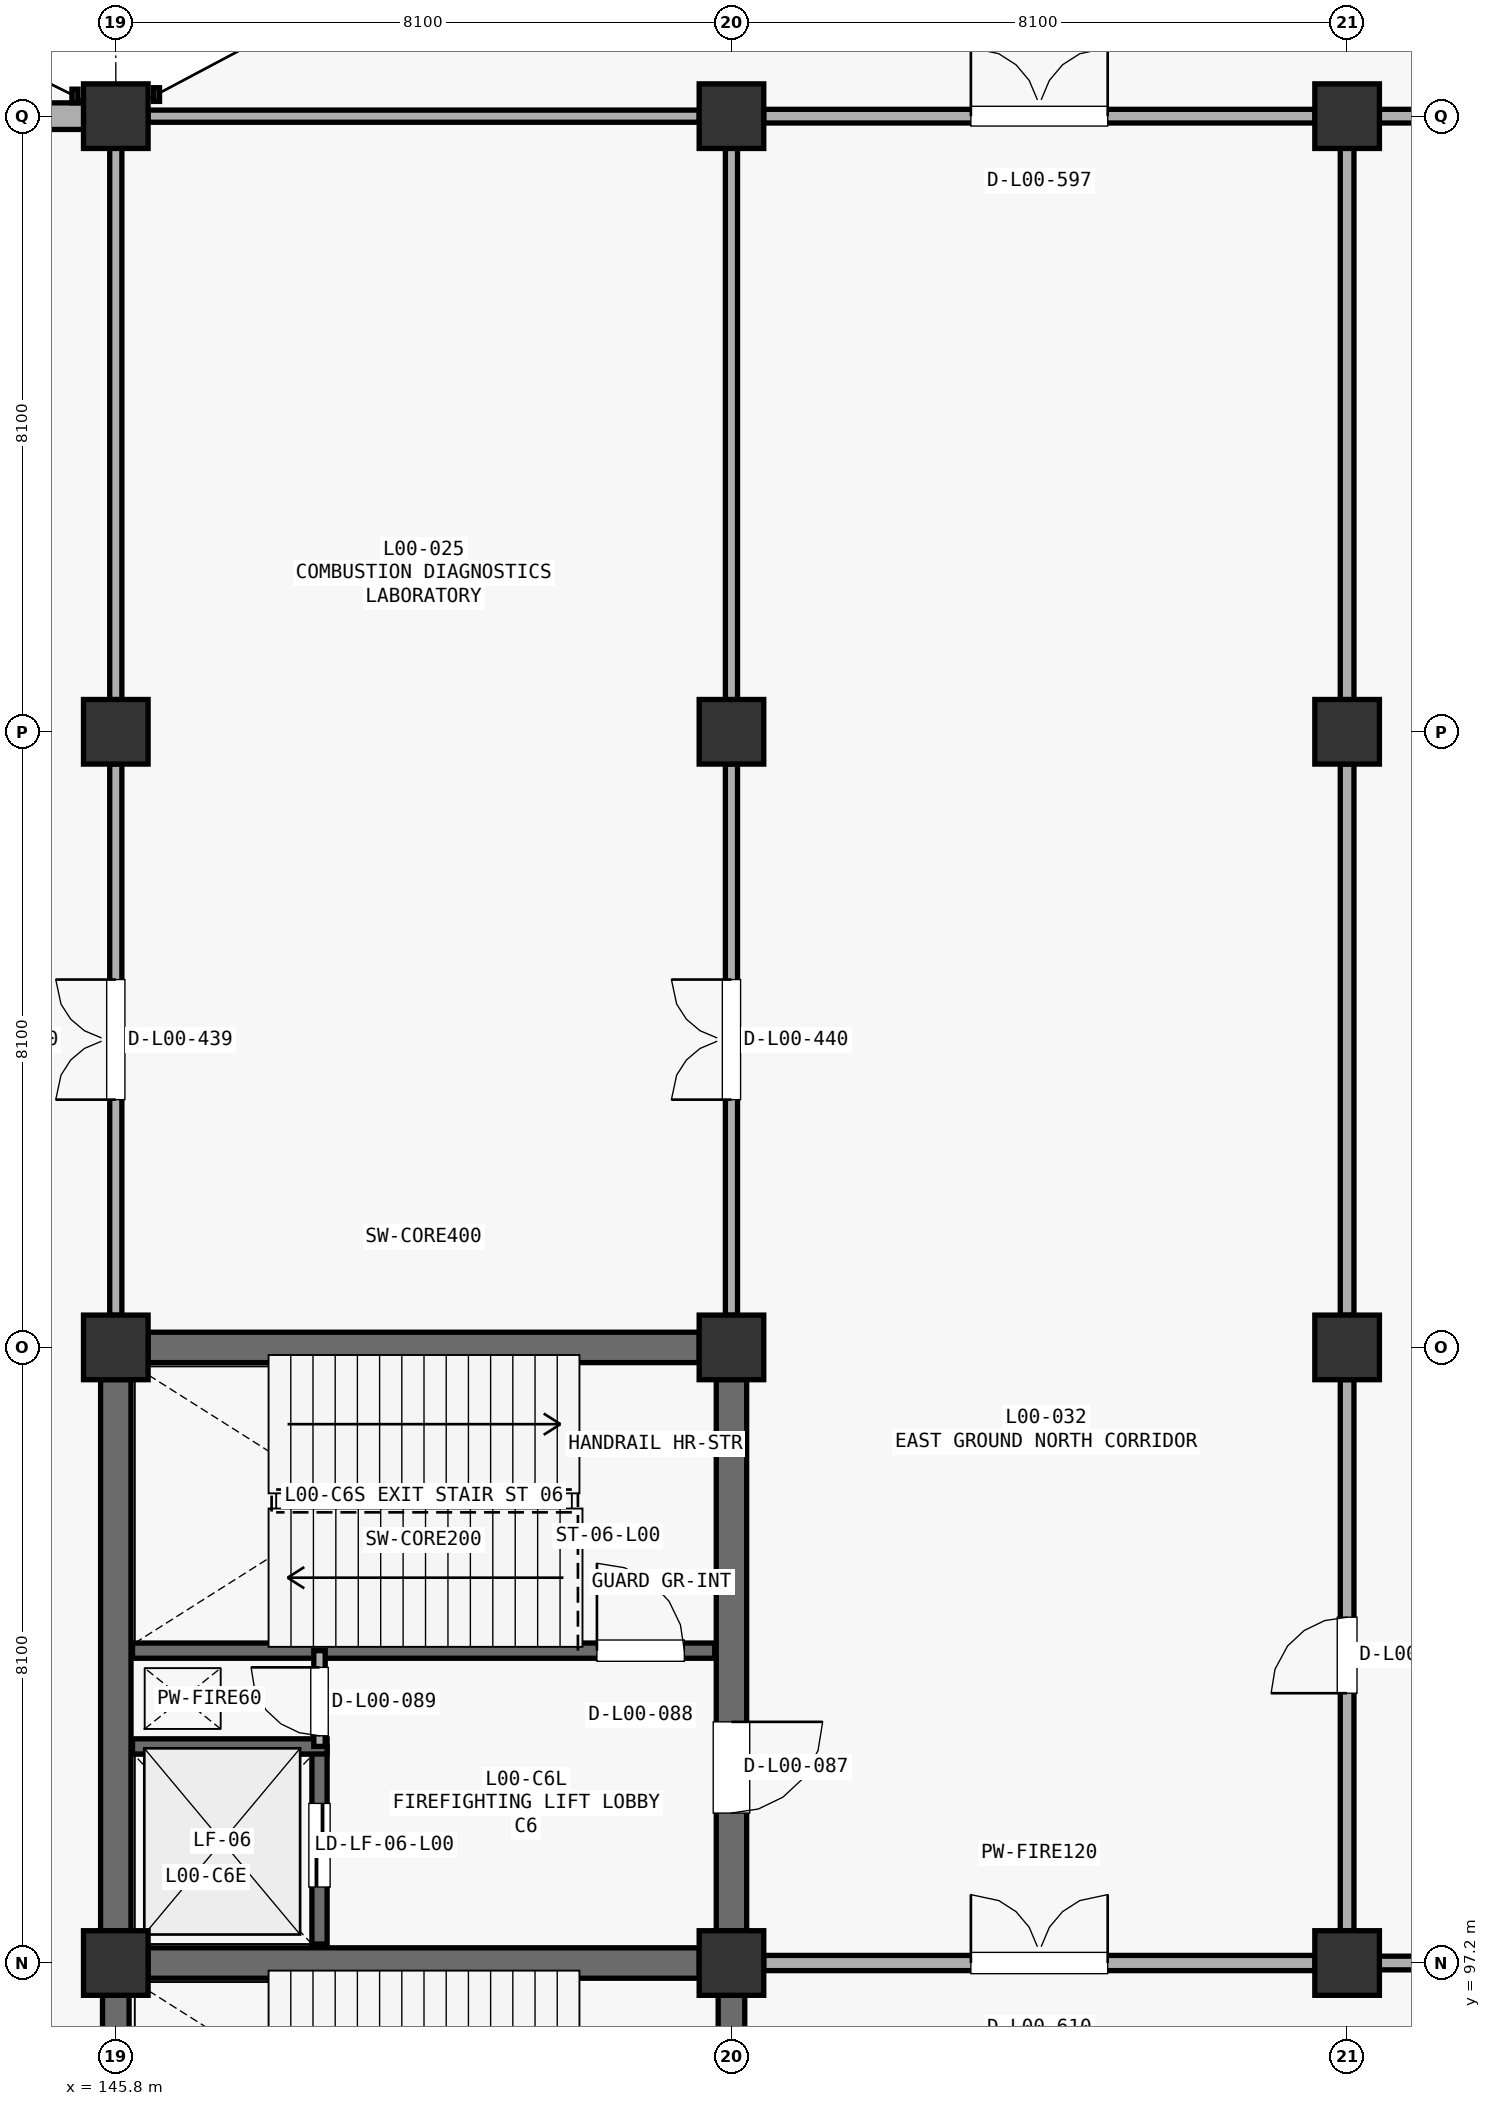
"""IFC4 building model, lengths in metres.
Left out: names, types, materials, properties, quantities, classifications, styles, units other than length and angle.
Written with IfcOpenShell. Run it as: python <this file> out.ifc"""

import sys

from ifc_helpers import new_model, si_unit, direction, frame, frame_2d, origin, origin_2d, place, context, subcontext, project, spatial, rectangle, extrude, element, fill, save


model = new_model("IFC4")
c1 = context("Model", 3, precision=1e-05, world=origin(), true_north=direction((0.0, 1.0)))
c2 = subcontext(c1, "Body", "Model", "MODEL_VIEW")
j1 = project(units=[si_unit("LENGTHUNIT", "METRE"), si_unit("PLANEANGLEUNIT", "RADIAN")], contexts=[c1])
p1 = place(None, origin())
s1 = spatial("IfcSite", under=j1, at=p1, CompositionType="ELEMENT")
p2 = place(p1, origin())
s2 = spatial("IfcBuilding", under=s1, at=p2, CompositionType="ELEMENT")
p3 = place(p2, origin())
s3 = spatial("IfcBuildingStorey", under=s2, at=p3, CompositionType="ELEMENT", Elevation=0.0)
for number, where, z_axis, x_axis in (
    (1, (145.8, 97.2, 0.0), (0.0, 0.0, 1.0), (1.0, 0.0, 0.0)),
    (2, (145.8, 105.3, 0.0), (0.0, 0.0, 1.0), (1.0, 0.0, 0.0)),
    (3, (145.8, 113.4, 0.0), (0.0, 0.0, 1.0), (1.0, 0.0, 0.0)),
    (4, (145.8, 121.5, 0.0), (0.0, 0.0, 1.0), (1.0, 0.0, 0.0)),
    (5, (153.9, 97.2, 0.0), (0.0, 0.0, 1.0), (1.0, 0.0, 0.0)),
    (6, (153.9, 105.3, 0.0), (0.0, 0.0, 1.0), (1.0, 0.0, 0.0)),
    (7, (153.9, 113.4, 0.0), (0.0, 0.0, 1.0), (1.0, 0.0, 0.0)),
    (8, (153.9, 121.5, 0.0), (0.0, 0.0, 1.0), (1.0, 0.0, 0.0)),
    (9, (162.0, 97.2, 0.0), (0.0, 0.0, 1.0), (1.0, 0.0, 0.0)),
    (10, (162.0, 105.3, 0.0), (0.0, 0.0, 1.0), (1.0, 0.0, 0.0)),
    (11, (162.0, 113.4, 0.0), (0.0, 0.0, 1.0), (1.0, 0.0, 0.0)),
    (12, (162.0, 121.5, 0.0), (0.0, 0.0, 1.0), (1.0, 0.0, 0.0)),
):
    element("IfcColumn", number, at=place(p3, frame(where, z_axis=z_axis, x_axis=x_axis)), inside=s3, PredefinedType="COLUMN", context=c2, shape_type="SweptSolid", body=[
        extrude(rectangle(XDim=0.85, YDim=0.85, at=origin_2d()), origin(), (0.0, 0.0, 1.0), 5.1),
    ])
p4 = place(p3, frame((138.123, 121.5, 0.0), z_axis=(0.0, 0.0, 1.0), x_axis=(1.0, 0.0, 0.0)))
e13 = element("IfcWall", 13, at=p4, inside=s3, PredefinedType="STANDARD", context=c2, shape_type="SweptSolid", body=[
    extrude(rectangle(XDim=7.254, YDim=0.35, at=frame_2d((3.627, 0.0))), origin(), (0.0, 0.0, 1.0), 3.972),
])
p5 = place(p4, frame((2.827, 0.0, 0.85)))
e14 = element("IfcOpeningElement", 14, at=p5, cuts=e13, PredefinedType="OPENING", context=c2, shape_type="SweptSolid", body=[
    extrude(rectangle(XDim=1.6, YDim=1.85, at=frame_2d((0.8, 0.925))), frame((0.0, 0.185, 0.0), z_axis=(0.0, -1.0, 0.0), x_axis=(1.0, 0.0, 0.0)), (0.0, 0.0, 1.0), 0.37),
])
p6 = place(p3, frame((146.223, 105.3, 0.0), z_axis=(0.0, 0.0, 1.0), x_axis=(1.0, 0.0, 0.0)))
e15 = element("IfcWall", 15, at=p6, inside=s3, PredefinedType="SHEAR", context=c2, shape_type="SweptSolid", body=[
    extrude(rectangle(XDim=7.254, YDim=0.4, at=frame_2d((3.627, 0.0))), origin(), (0.0, 0.0, 1.0), 4.822),
])
p7 = place(p3, frame((145.8, 97.623, 0.0), z_axis=(0.0, 0.0, 1.0), x_axis=(0.0, 1.0, 0.0)))
e16 = element("IfcWall", 16, at=p7, inside=s3, PredefinedType="SHEAR", context=c2, shape_type="SweptSolid", body=[
    extrude(rectangle(XDim=7.254, YDim=0.4, at=frame_2d((3.627, 0.0))), origin(), (0.0, 0.0, 1.0), 4.822),
])
p8 = place(p3, frame((153.9, 97.623, 0.0), z_axis=(0.0, 0.0, 1.0), x_axis=(0.0, 1.0, 0.0)))
e17 = element("IfcWall", 17, at=p8, inside=s3, PredefinedType="SHEAR", context=c2, shape_type="SweptSolid", body=[
    extrude(rectangle(XDim=7.254, YDim=0.4, at=frame_2d((3.627, 0.0))), origin(), (0.0, 0.0, 1.0), 4.822),
])
p9 = place(p8, frame((2.75, 0.0, 0.0), z_axis=(0.0, 0.0, 1.0), x_axis=(-1.0, 0.0, 0.0)))
e18 = element("IfcOpeningElement", 18, at=p9, cuts=e17, PredefinedType="OPENING", context=c2, shape_type="SweptSolid", body=[
    extrude(rectangle(XDim=1.2, YDim=2.2, at=frame_2d((0.6, 1.1))), frame((0.0, 0.21, 0.0), z_axis=(0.0, -1.0, 0.0), x_axis=(1.0, 0.0, 0.0)), (0.0, 0.0, 1.0), 0.42),
])
p10 = place(p3, frame((146.223, 97.2, 0.0), z_axis=(0.0, 0.0, 1.0), x_axis=(1.0, 0.0, 0.0)))
e19 = element("IfcWall", 19, at=p10, inside=s3, PredefinedType="SHEAR", context=c2, shape_type="SweptSolid", body=[
    extrude(rectangle(XDim=7.254, YDim=0.4, at=frame_2d((3.627, 0.0))), origin(), (0.0, 0.0, 1.0), 4.822),
])
p11 = place(p3, frame((146.02, 101.31, 0.0), z_axis=(0.0, 0.0, 1.0), x_axis=(1.0, 0.0, 0.0)))
e20 = element("IfcWall", 20, at=p11, inside=s3, PredefinedType="SHEAR", context=c2, shape_type="SweptSolid", body=[
    extrude(rectangle(XDim=7.66, YDim=0.2, at=frame_2d((3.83, 0.0))), origin(), (0.0, 0.0, 1.0), 4.822),
])
p12 = place(p11, frame((6.11, 0.0, 0.0)))
e21 = element("IfcOpeningElement", 21, at=p12, cuts=e20, PredefinedType="OPENING", context=c2, shape_type="SweptSolid", body=[
    extrude(rectangle(XDim=1.15, YDim=2.2, at=frame_2d((0.575, 1.1))), frame((0.0, 0.11, 0.0), z_axis=(0.0, -1.0, 0.0), x_axis=(1.0, 0.0, 0.0)), (0.0, 0.0, 1.0), 0.22),
])
p13 = place(p3, frame((148.48, 97.45, 0.0), z_axis=(0.0, 0.0, 1.0), x_axis=(0.0, 1.0, 0.0)))
e22 = element("IfcWall", 22, at=p13, inside=s3, PredefinedType="SHEAR", context=c2, shape_type="SweptSolid", body=[
    extrude(rectangle(XDim=2.6, YDim=0.2, at=frame_2d((1.3, 0.0))), origin(), (0.0, 0.0, 1.0), 4.822),
])
p14 = place(p13, frame((0.75, 0.0, 0.0)))
e23 = element("IfcOpeningElement", 23, at=p14, cuts=e22, PredefinedType="OPENING", context=c2, shape_type="SweptSolid", body=[
    extrude(rectangle(XDim=1.1, YDim=2.2, at=frame_2d((0.55, 1.1))), frame((0.0, 0.11, 0.0), z_axis=(0.0, -1.0, 0.0), x_axis=(1.0, 0.0, 0.0)), (0.0, 0.0, 1.0), 0.22),
])
p15 = place(p3, frame((146.02, 100.05, 0.0), z_axis=(0.0, 0.0, 1.0), x_axis=(1.0, 0.0, 0.0)))
e24 = element("IfcWall", 24, at=p15, inside=s3, PredefinedType="SHEAR", context=c2, shape_type="SweptSolid", body=[
    extrude(rectangle(XDim=2.56, YDim=0.2, at=frame_2d((1.28, 0.0))), origin(), (0.0, 0.0, 1.0), 4.822),
])
p16 = place(p3, frame((148.48, 100.05, 0.0), z_axis=(0.0, 0.0, 1.0), x_axis=(0.0, 1.0, 0.0)))
e25 = element("IfcWall", 25, at=p16, inside=s3, PredefinedType="PARTITIONING", context=c2, shape_type="SweptSolid", body=[
    extrude(rectangle(XDim=1.26, YDim=0.15, at=frame_2d((0.63, 0.0))), origin(), (0.0, 0.0, 1.0), 4.822),
])
p17 = place(p16, frame((0.14, 0.0, 0.0)))
e26 = element("IfcOpeningElement", 26, at=p17, cuts=e25, PredefinedType="OPENING", context=c2, shape_type="SweptSolid", body=[
    extrude(rectangle(XDim=0.9, YDim=2.15, at=frame_2d((0.45, 1.075))), frame((0.0, 0.085, 0.0), z_axis=(0.0, -1.0, 0.0), x_axis=(1.0, 0.0, 0.0)), (0.0, 0.0, 1.0), 0.17),
])
p18 = place(p3, frame((145.8, 89.523, 0.0), z_axis=(0.0, 0.0, 1.0), x_axis=(0.0, 1.0, 0.0)))
e27 = element("IfcWall", 27, at=p18, inside=s3, PredefinedType="SHEAR", context=c2, shape_type="SweptSolid", body=[
    extrude(rectangle(XDim=7.254, YDim=0.35, at=frame_2d((3.627, 0.0))), origin(), (0.0, 0.0, 1.0), 4.822),
])
p19 = place(p3, frame((153.9, 89.523, 0.0), z_axis=(0.0, 0.0, 1.0), x_axis=(0.0, 1.0, 0.0)))
e28 = element("IfcWall", 28, at=p19, inside=s3, PredefinedType="SHEAR", context=c2, shape_type="SweptSolid", body=[
    extrude(rectangle(XDim=7.254, YDim=0.35, at=frame_2d((3.627, 0.0))), origin(), (0.0, 0.0, 1.0), 4.822),
])
p20 = place(p19, frame((2.75, 0.0, 0.0), z_axis=(0.0, 0.0, 1.0), x_axis=(-1.0, 0.0, 0.0)))
e29 = element("IfcOpeningElement", 29, at=p20, cuts=e28, PredefinedType="OPENING", context=c2, shape_type="SweptSolid", body=[
    extrude(rectangle(XDim=1.2, YDim=2.2, at=frame_2d((0.6, 1.1))), frame((0.0, 0.185, 0.0), z_axis=(0.0, -1.0, 0.0), x_axis=(1.0, 0.0, 0.0)), (0.0, 0.0, 1.0), 0.37),
])
p21 = place(p3, frame((145.8, 105.723, 0.0), z_axis=(0.0, 0.0, 1.0), x_axis=(0.0, 1.0, 0.0)))
e30 = element("IfcWall", 30, at=p21, inside=s3, PredefinedType="PARTITIONING", context=c2, shape_type="SweptSolid", body=[
    extrude(rectangle(XDim=7.254, YDim=0.16, at=frame_2d((3.627, 0.0))), origin(), (0.0, 0.0, 1.0), 4.072),
])
p22 = place(p21, frame((2.837, 0.0, 0.0)))
e31 = element("IfcOpeningElement", 31, at=p22, cuts=e30, PredefinedType="OPENING", context=c2, shape_type="SweptSolid", body=[
    extrude(rectangle(XDim=1.58, YDim=2.2, at=frame_2d((0.79, 1.1))), frame((0.0, 0.09, 0.0), z_axis=(0.0, -1.0, 0.0), x_axis=(1.0, 0.0, 0.0)), (0.0, 0.0, 1.0), 0.18),
])
p23 = place(p3, frame((145.8, 113.823, 0.0), z_axis=(0.0, 0.0, 1.0), x_axis=(0.0, 1.0, 0.0)))
e32 = element("IfcWall", 32, at=p23, inside=s3, PredefinedType="PARTITIONING", context=c2, shape_type="SweptSolid", body=[
    extrude(rectangle(XDim=7.254, YDim=0.16, at=frame_2d((3.627, 0.0))), origin(), (0.0, 0.0, 1.0), 4.172),
])
p24 = place(p3, frame((153.9, 105.723, 0.0), z_axis=(0.0, 0.0, 1.0), x_axis=(0.0, 1.0, 0.0)))
e33 = element("IfcWall", 33, at=p24, inside=s3, PredefinedType="PARTITIONING", context=c2, shape_type="SweptSolid", body=[
    extrude(rectangle(XDim=7.254, YDim=0.16, at=frame_2d((3.627, 0.0))), origin(), (0.0, 0.0, 1.0), 4.222),
])
p25 = place(p24, frame((2.837, 0.0, 0.0)))
e34 = element("IfcOpeningElement", 34, at=p25, cuts=e33, PredefinedType="OPENING", context=c2, shape_type="SweptSolid", body=[
    extrude(rectangle(XDim=1.58, YDim=2.2, at=frame_2d((0.79, 1.1))), frame((0.0, 0.09, 0.0), z_axis=(0.0, -1.0, 0.0), x_axis=(1.0, 0.0, 0.0)), (0.0, 0.0, 1.0), 0.18),
])
p26 = place(p3, frame((153.9, 113.823, 0.0), z_axis=(0.0, 0.0, 1.0), x_axis=(0.0, 1.0, 0.0)))
e35 = element("IfcWall", 35, at=p26, inside=s3, PredefinedType="PARTITIONING", context=c2, shape_type="SweptSolid", body=[
    extrude(rectangle(XDim=7.254, YDim=0.16, at=frame_2d((3.627, 0.0))), origin(), (0.0, 0.0, 1.0), 3.972),
])
p27 = place(p3, frame((146.223, 121.5, 0.0), z_axis=(0.0, 0.0, 1.0), x_axis=(1.0, 0.0, 0.0)))
e36 = element("IfcWall", 36, at=p27, inside=s3, PredefinedType="PARTITIONING", context=c2, shape_type="SweptSolid", body=[
    extrude(rectangle(XDim=7.254, YDim=0.16, at=frame_2d((3.627, 0.0))), origin(), (0.0, 0.0, 1.0), 4.172),
])
p28 = place(p3, frame((162.0, 97.623, 0.0), z_axis=(0.0, 0.0, 1.0), x_axis=(0.0, 1.0, 0.0)))
e37 = element("IfcWall", 37, at=p28, inside=s3, PredefinedType="PARTITIONING", context=c2, shape_type="SweptSolid", body=[
    extrude(rectangle(XDim=7.254, YDim=0.18, at=frame_2d((3.627, 0.0))), origin(), (0.0, 0.0, 1.0), 3.972),
])
p29 = place(p28, frame((3.127, 0.0, 0.0)))
e38 = element("IfcOpeningElement", 38, at=p29, cuts=e37, PredefinedType="OPENING", context=c2, shape_type="SweptSolid", body=[
    extrude(rectangle(XDim=1.0, YDim=2.15, at=frame_2d((0.5, 1.075))), frame((0.0, 0.1, 0.0), z_axis=(0.0, -1.0, 0.0), x_axis=(1.0, 0.0, 0.0)), (0.0, 0.0, 1.0), 0.2),
])
p30 = place(p3, frame((162.0, 105.723, 0.0), z_axis=(0.0, 0.0, 1.0), x_axis=(0.0, 1.0, 0.0)))
e39 = element("IfcWall", 39, at=p30, inside=s3, PredefinedType="PARTITIONING", context=c2, shape_type="SweptSolid", body=[
    extrude(rectangle(XDim=7.254, YDim=0.18, at=frame_2d((3.627, 0.0))), origin(), (0.0, 0.0, 1.0), 3.872),
])
p31 = place(p3, frame((162.0, 113.823, 0.0), z_axis=(0.0, 0.0, 1.0), x_axis=(0.0, 1.0, 0.0)))
e40 = element("IfcWall", 40, at=p31, inside=s3, PredefinedType="PARTITIONING", context=c2, shape_type="SweptSolid", body=[
    extrude(rectangle(XDim=7.254, YDim=0.18, at=frame_2d((3.627, 0.0))), origin(), (0.0, 0.0, 1.0), 4.072),
])
p32 = place(p3, frame((162.423, 121.5, 0.0), z_axis=(0.0, 0.0, 1.0), x_axis=(1.0, 0.0, 0.0)))
e41 = element("IfcWall", 41, at=p32, inside=s3, PredefinedType="PARTITIONING", context=c2, shape_type="SweptSolid", body=[
    extrude(rectangle(XDim=7.254, YDim=0.18, at=frame_2d((3.627, 0.0))), origin(), (0.0, 0.0, 1.0), 4.172),
])
p33 = place(p3, frame((162.423, 97.2, 0.0), z_axis=(0.0, 0.0, 1.0), x_axis=(1.0, 0.0, 0.0)))
e42 = element("IfcWall", 42, at=p33, inside=s3, PredefinedType="PARTITIONING", context=c2, shape_type="SweptSolid", body=[
    extrude(rectangle(XDim=7.254, YDim=0.18, at=frame_2d((3.627, 0.0))), origin(), (0.0, 0.0, 1.0), 3.972),
])
p34 = place(p3, frame((154.323, 121.5, 0.0), z_axis=(0.0, 0.0, 1.0), x_axis=(1.0, 0.0, 0.0)))
e43 = element("IfcWall", 43, at=p34, inside=s3, PredefinedType="PARTITIONING", context=c2, shape_type="SweptSolid", body=[
    extrude(rectangle(XDim=7.254, YDim=0.18, at=frame_2d((3.627, 0.0))), origin(), (0.0, 0.0, 1.0), 4.072),
])
p35 = place(p34, frame((2.727, 0.0, 0.0)))
e44 = element("IfcOpeningElement", 44, at=p35, cuts=e43, PredefinedType="OPENING", context=c2, shape_type="SweptSolid", body=[
    extrude(rectangle(XDim=1.8, YDim=2.2, at=frame_2d((0.9, 1.1))), frame((0.0, 0.1, 0.0), z_axis=(0.0, -1.0, 0.0), x_axis=(1.0, 0.0, 0.0)), (0.0, 0.0, 1.0), 0.2),
])
p36 = place(p3, frame((154.323, 97.2, 0.0), z_axis=(0.0, 0.0, 1.0), x_axis=(1.0, 0.0, 0.0)))
e45 = element("IfcWall", 45, at=p36, inside=s3, PredefinedType="PARTITIONING", context=c2, shape_type="SweptSolid", body=[
    extrude(rectangle(XDim=7.254, YDim=0.2, at=frame_2d((3.627, 0.0))), origin(), (0.0, 0.0, 1.0), 4.222),
])
p37 = place(p36, frame((2.727, 0.0, 0.0)))
e46 = element("IfcOpeningElement", 46, at=p37, cuts=e45, PredefinedType="OPENING", context=c2, shape_type="SweptSolid", body=[
    extrude(rectangle(XDim=1.8, YDim=2.2, at=frame_2d((0.9, 1.1))), frame((0.0, 0.11, 0.0), z_axis=(0.0, -1.0, 0.0), x_axis=(1.0, 0.0, 0.0)), (0.0, 0.0, 1.0), 0.22),
])
p38 = place(p9, origin())
e47 = element("IfcDoor", 47, at=p38, inside=s3, OperationType="SINGLE_SWING_RIGHT", PredefinedType="DOOR", context=c2, shape_type="SweptSolid", body=[
    extrude(rectangle(XDim=1.2, YDim=2.2, at=frame_2d((0.6, 1.1))), frame((0.0, 0.025, 0.0), z_axis=(0.0, -1.0, 0.0), x_axis=(1.0, 0.0, 0.0)), (0.0, 0.0, 1.0), 0.05),
])
fill(e18, e47)
p39 = place(p12, origin())
e48 = element("IfcDoor", 48, at=p39, inside=s3, OperationType="SINGLE_SWING_LEFT", PredefinedType="DOOR", context=c2, shape_type="SweptSolid", body=[
    extrude(rectangle(XDim=1.15, YDim=2.2, at=frame_2d((0.575, 1.1))), frame((0.0, 0.025, 0.0), z_axis=(0.0, -1.0, 0.0), x_axis=(1.0, 0.0, 0.0)), (0.0, 0.0, 1.0), 0.05),
])
fill(e21, e48)
p40 = place(p14, origin())
e49 = element("IfcDoor", 49, at=p40, inside=s3, OperationType="SLIDING_TO_LEFT", PredefinedType="DOOR", context=c2, shape_type="SweptSolid", body=[
    extrude(rectangle(XDim=1.1, YDim=2.2, at=frame_2d((0.55, 1.1))), frame((0.0, 0.025, 0.0), z_axis=(0.0, -1.0, 0.0), x_axis=(1.0, 0.0, 0.0)), (0.0, 0.0, 1.0), 0.05),
])
fill(e23, e49)
p41 = place(p17, origin())
e50 = element("IfcDoor", 50, at=p41, inside=s3, OperationType="SINGLE_SWING_RIGHT", PredefinedType="DOOR", context=c2, shape_type="SweptSolid", body=[
    extrude(rectangle(XDim=0.9, YDim=2.15, at=frame_2d((0.45, 1.075))), frame((0.0, 0.025, 0.0), z_axis=(0.0, -1.0, 0.0), x_axis=(1.0, 0.0, 0.0)), (0.0, 0.0, 1.0), 0.05),
])
fill(e26, e50)
p42 = place(p22, origin())
e51 = element("IfcDoor", 51, at=p42, inside=s3, OperationType="DOUBLE_SWING_LEFT", PredefinedType="DOOR", context=c2, shape_type="SweptSolid", body=[
    extrude(rectangle(XDim=1.58, YDim=2.2, at=frame_2d((0.79, 1.1))), frame((0.0, 0.025, 0.0), z_axis=(0.0, -1.0, 0.0), x_axis=(1.0, 0.0, 0.0)), (0.0, 0.0, 1.0), 0.05),
])
fill(e31, e51)
p43 = place(p25, origin())
e52 = element("IfcDoor", 52, at=p43, inside=s3, OperationType="DOUBLE_SWING_LEFT", PredefinedType="DOOR", context=c2, shape_type="SweptSolid", body=[
    extrude(rectangle(XDim=1.58, YDim=2.2, at=frame_2d((0.79, 1.1))), frame((0.0, 0.025, 0.0), z_axis=(0.0, -1.0, 0.0), x_axis=(1.0, 0.0, 0.0)), (0.0, 0.0, 1.0), 0.05),
])
fill(e34, e52)
p44 = place(p29, origin())
e53 = element("IfcDoor", 53, at=p44, inside=s3, OperationType="SINGLE_SWING_LEFT", PredefinedType="DOOR", context=c2, shape_type="SweptSolid", body=[
    extrude(rectangle(XDim=1.0, YDim=2.15, at=frame_2d((0.5, 1.075))), frame((0.0, 0.025, 0.0), z_axis=(0.0, -1.0, 0.0), x_axis=(1.0, 0.0, 0.0)), (0.0, 0.0, 1.0), 0.05),
])
fill(e38, e53)
p45 = place(p35, origin())
e54 = element("IfcDoor", 54, at=p45, inside=s3, OperationType="DOUBLE_SWING_LEFT", PredefinedType="DOOR", context=c2, shape_type="SweptSolid", body=[
    extrude(rectangle(XDim=1.8, YDim=2.2, at=frame_2d((0.9, 1.1))), frame((0.0, 0.025, 0.0), z_axis=(0.0, -1.0, 0.0), x_axis=(1.0, 0.0, 0.0)), (0.0, 0.0, 1.0), 0.05),
])
fill(e44, e54)
p46 = place(p37, origin())
e55 = element("IfcDoor", 55, at=p46, inside=s3, OperationType="DOUBLE_SWING_LEFT", PredefinedType="DOOR", context=c2, shape_type="SweptSolid", body=[
    extrude(rectangle(XDim=1.8, YDim=2.2, at=frame_2d((0.9, 1.1))), frame((0.0, 0.025, 0.0), z_axis=(0.0, -1.0, 0.0), x_axis=(1.0, 0.0, 0.0)), (0.0, 0.0, 1.0), 0.05),
])
fill(e46, e55)
save(model, sys.argv[1])
